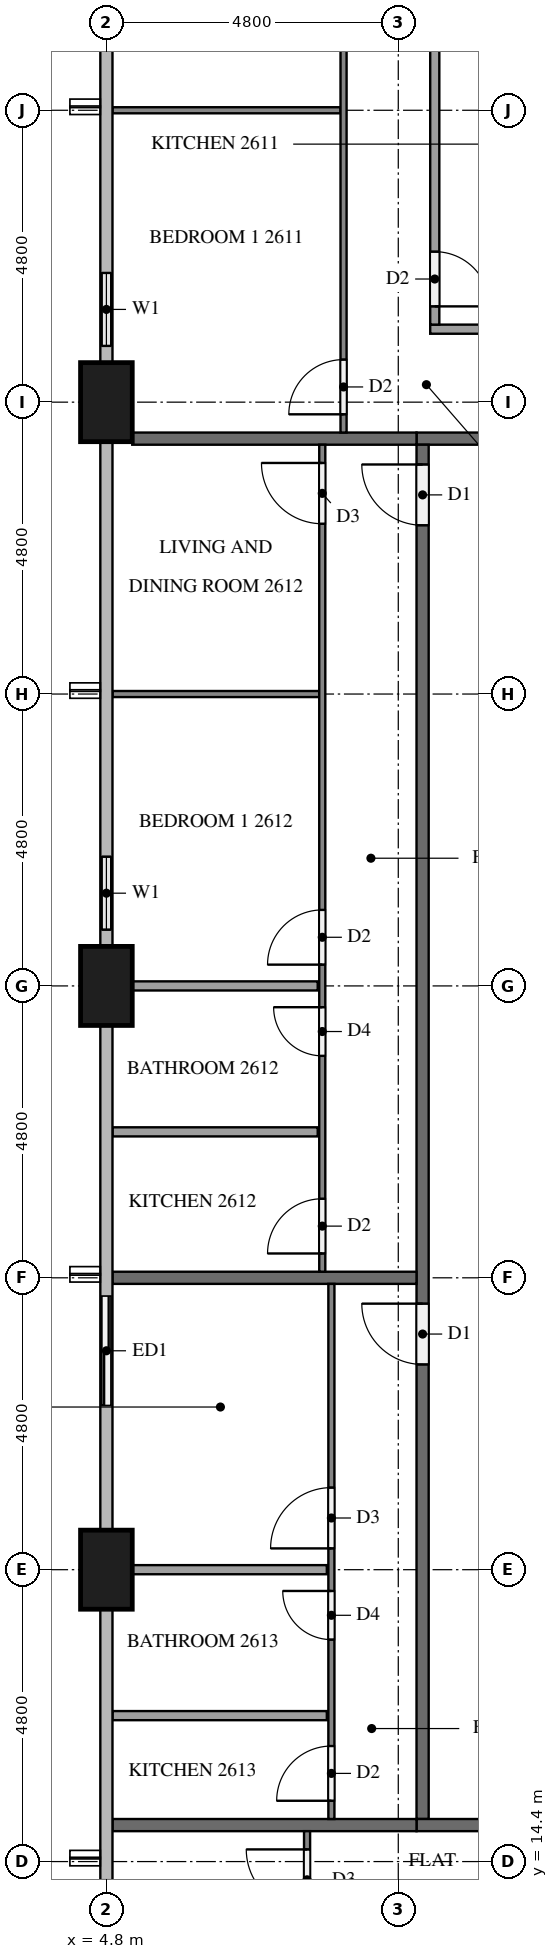
"""IFC4 building model, lengths in metres.
Left out: names, types, materials, properties, quantities, classifications, styles, units other than length and angle.
Written with IfcOpenShell. Run it as: python <this file> out.ifc"""

import sys

from ifc_helpers import new_model, si_unit, direction, frame, frame_2d, origin, origin_2d, place, context, subcontext, project, spatial, rectangle, extrude, element, fill, save


model = new_model("IFC4")
c1 = context("Model", 3, precision=1e-05, world=origin(), true_north=direction((0.0, 1.0)))
c2 = subcontext(c1, "Body", "Model", "MODEL_VIEW")
j1 = project(units=[si_unit("LENGTHUNIT", "METRE"), si_unit("PLANEANGLEUNIT", "RADIAN")], contexts=[c1])
p1 = place(None, origin())
s1 = spatial("IfcSite", under=j1, at=p1, CompositionType="ELEMENT")
p2 = place(p1, origin())
s2 = spatial("IfcBuilding", under=s1, at=p2, CompositionType="ELEMENT")
p3 = place(p2, frame((0.0, 0.0, 103.2)))
s3 = spatial("IfcBuildingStorey", under=s2, at=p3, CompositionType="ELEMENT", Elevation=103.2)
for number, where, z_axis, x_axis in (
    (1, (4.8, 38.4, 0.0), (0.0, 0.0, 1.0), (0.0, 1.0, 0.0)),
    (2, (4.8, 28.8, 0.0), (0.0, 0.0, 1.0), (0.0, 1.0, 0.0)),
    (3, (4.8, 19.2, 0.0), (0.0, 0.0, 1.0), (0.0, 1.0, 0.0)),
):
    element("IfcColumn", number, at=place(p3, frame(where, z_axis=z_axis, x_axis=x_axis)), inside=s3, PredefinedType="COLUMN", context=c2, shape_type="SweptSolid", body=[
        extrude(rectangle(XDim=1.3, YDim=0.85, at=origin_2d()), origin(), (0.0, 0.0, 1.0), 3.2),
    ])
p4 = place(p3, frame((4.8, 40.8, 0.0), z_axis=(0.0, 0.0, 1.0), x_axis=(0.0, -1.0, 0.0)))
e4 = element("IfcWall", 4, at=p4, inside=s3, PredefinedType="SOLIDWALL", context=c2, shape_type="SweptSolid", body=[
    extrude(rectangle(XDim=1.75, YDim=0.15, at=frame_2d((0.875, 0.0))), origin(), (0.0, 0.0, 1.0), 3.2),
])
p5 = place(p4, frame((0.275, 0.0, 0.9)))
e5 = element("IfcOpeningElement", 5, at=p5, cuts=e4, PredefinedType="OPENING", context=c2, shape_type="SweptSolid", body=[
    extrude(rectangle(XDim=1.2, YDim=1.4, at=frame_2d((0.6, 0.7))), frame((0.0, 0.085, 0.0), z_axis=(0.0, -1.0, 0.0), x_axis=(1.0, 0.0, 0.0)), (0.0, 0.0, 1.0), 0.17),
])
p6 = place(p3, frame((4.8, 31.2, 0.0), z_axis=(0.0, 0.0, 1.0), x_axis=(0.0, -1.0, 0.0)))
e6 = element("IfcWall", 6, at=p6, inside=s3, PredefinedType="SOLIDWALL", context=c2, shape_type="SweptSolid", body=[
    extrude(rectangle(XDim=1.75, YDim=0.15, at=frame_2d((0.875, 0.0))), origin(), (0.0, 0.0, 1.0), 3.2),
])
p7 = place(p6, frame((0.275, 0.0, 0.9)))
e7 = element("IfcOpeningElement", 7, at=p7, cuts=e6, PredefinedType="OPENING", context=c2, shape_type="SweptSolid", body=[
    extrude(rectangle(XDim=1.2, YDim=1.4, at=frame_2d((0.6, 0.7))), frame((0.0, 0.085, 0.0), z_axis=(0.0, -1.0, 0.0), x_axis=(1.0, 0.0, 0.0)), (0.0, 0.0, 1.0), 0.17),
])
p8 = place(p3, frame((4.8, 24.0, 0.0), z_axis=(0.0, 0.0, 1.0), x_axis=(0.0, -1.0, 0.0)))
e8 = element("IfcWall", 8, at=p8, inside=s3, PredefinedType="SOLIDWALL", context=c2, shape_type="SweptSolid", body=[
    extrude(rectangle(XDim=2.4, YDim=0.15, at=frame_2d((1.2, 0.0))), origin(), (0.0, 0.0, 1.0), 3.2),
])
p9 = place(p8, frame((0.3, 0.0, 0.0)))
e9 = element("IfcOpeningElement", 9, at=p9, cuts=e8, PredefinedType="OPENING", context=c2, shape_type="SweptSolid", body=[
    extrude(rectangle(XDim=1.8, YDim=2.4, at=frame_2d((0.9, 1.2))), frame((0.0, 0.085, 0.0), z_axis=(0.0, -1.0, 0.0), x_axis=(1.0, 0.0, 0.0)), (0.0, 0.0, 1.0), 0.17),
])
p10 = place(p3, frame((4.8, 14.4, 0.0), z_axis=(0.0, 0.0, 1.0), x_axis=(0.0, -1.0, 0.0)))
e10 = element("IfcWall", 10, at=p10, inside=s3, PredefinedType="SOLIDWALL", context=c2, shape_type="SweptSolid", body=[
    extrude(rectangle(XDim=2.4, YDim=0.15, at=frame_2d((1.2, 0.0))), origin(), (0.0, 0.0, 1.0), 3.2),
])
p11 = place(p10, frame((0.3, 0.0, 0.0)))
e11 = element("IfcOpeningElement", 11, at=p11, cuts=e10, PredefinedType="OPENING", context=c2, shape_type="SweptSolid", body=[
    extrude(rectangle(XDim=1.8, YDim=2.4, at=frame_2d((0.9, 1.2))), frame((0.0, 0.085, 0.0), z_axis=(0.0, -1.0, 0.0), x_axis=(1.0, 0.0, 0.0)), (0.0, 0.0, 1.0), 0.17),
])
p12 = place(p3, frame((12.1, 37.8, 0.0), z_axis=(0.0, 0.0, 1.0), x_axis=(-1.0, 0.0, 0.0)))
e12 = element("IfcWall", 12, at=p12, inside=s3, PredefinedType="PARTITIONING", context=c2, shape_type="SweptSolid", body=[
    extrude(rectangle(XDim=2.2, YDim=0.2, at=frame_2d((1.1, 0.0))), origin(), (0.0, 0.0, 1.0), 3.2),
])
p13 = place(p3, frame((10.0, 15.1, 0.0), z_axis=(0.0, 0.0, 1.0), x_axis=(0.0, 1.0, 0.0)))
e13 = element("IfcWall", 13, at=p13, inside=s3, PredefinedType="PARTITIONING", context=c2, shape_type="SweptSolid", body=[
    extrude(rectangle(XDim=22.6, YDim=0.2, at=frame_2d((11.3, 0.0))), origin(), (0.0, 0.0, 1.0), 3.2),
])
p14 = place(p13, frame((21.275, 0.0, 0.0)))
e14 = element("IfcOpeningElement", 14, at=p14, cuts=e13, PredefinedType="OPENING", context=c2, shape_type="SweptSolid", body=[
    extrude(rectangle(XDim=1.0, YDim=2.1, at=frame_2d((0.5, 1.05))), frame((0.0, 0.11, 0.0), z_axis=(0.0, -1.0, 0.0), x_axis=(1.0, 0.0, 0.0)), (0.0, 0.0, 1.0), 0.22),
])
p15 = place(p13, frame((7.475, 0.0, 0.0)))
e15 = element("IfcOpeningElement", 15, at=p15, cuts=e13, PredefinedType="OPENING", context=c2, shape_type="SweptSolid", body=[
    extrude(rectangle(XDim=1.0, YDim=2.1, at=frame_2d((0.5, 1.05))), frame((0.0, 0.11, 0.0), z_axis=(0.0, -1.0, 0.0), x_axis=(1.0, 0.0, 0.0)), (0.0, 0.0, 1.0), 0.22),
])
p16 = place(p3, frame((9.9, 15.0, 0.0), z_axis=(0.0, 0.0, 1.0), x_axis=(1.0, 0.0, 0.0)))
e16 = element("IfcWall", 16, at=p16, inside=s3, PredefinedType="PARTITIONING", context=c2, shape_type="SweptSolid", body=[
    extrude(rectangle(XDim=2.2, YDim=0.2, at=frame_2d((1.1, 0.0))), origin(), (0.0, 0.0, 1.0), 3.2),
])
p17 = place(p3, frame((5.225, 37.8, 0.0), z_axis=(0.0, 0.0, 1.0), x_axis=(1.0, 0.0, 0.0)))
e17 = element("IfcWall", 17, at=p17, inside=s3, PredefinedType="PARTITIONING", context=c2, shape_type="SweptSolid", body=[
    extrude(rectangle(XDim=4.675, YDim=0.2, at=frame_2d((2.337, 0.0))), origin(), (0.0, 0.0, 1.0), 3.2),
])
for number, where, z_axis, x_axis in (
    (18, (4.9, 24.0, 0.0), (0.0, 0.0, 1.0), (1.0, 0.0, 0.0)),
    (19, (4.9, 15.0, 0.0), (0.0, 0.0, 1.0), (1.0, 0.0, 0.0)),
):
    element("IfcWall", number, at=place(p3, frame(where, z_axis=z_axis, x_axis=x_axis)), inside=s3, PredefinedType="PARTITIONING", context=c2, shape_type="SweptSolid", body=[
        extrude(rectangle(XDim=5.0, YDim=0.2, at=frame_2d((2.5, 0.0))), origin(), (0.0, 0.0, 1.0), 3.2),
    ])
p18 = place(p3, frame((8.65, 43.2, 0.0), z_axis=(0.0, 0.0, 1.0), x_axis=(-1.0, 0.0, 0.0)))
e20 = element("IfcWall", 20, at=p18, inside=s3, PredefinedType="PARTITIONING", context=c2, shape_type="SweptSolid", body=[
    extrude(rectangle(XDim=3.75, YDim=0.1, at=frame_2d((1.875, 0.0))), origin(), (0.0, 0.0, 1.0), 3.2),
])
p19 = place(p3, frame((8.7, 37.9, 0.0), z_axis=(0.0, 0.0, 1.0), x_axis=(0.0, 1.0, 0.0)))
e21 = element("IfcWall", 21, at=p19, inside=s3, PredefinedType="PARTITIONING", context=c2, shape_type="SweptSolid", body=[
    extrude(rectangle(XDim=14.559, YDim=0.1, at=frame_2d((7.279, 0.0))), origin(), (0.0, 0.0, 1.0), 3.2),
])
p20 = place(p19, frame((0.3, 0.0, 0.0)))
e22 = element("IfcOpeningElement", 22, at=p20, cuts=e21, PredefinedType="OPENING", context=c2, shape_type="SweptSolid", body=[
    extrude(rectangle(XDim=0.9, YDim=2.1, at=frame_2d((0.45, 1.05))), frame((0.0, 0.06, 0.0), z_axis=(0.0, -1.0, 0.0), x_axis=(1.0, 0.0, 0.0)), (0.0, 0.0, 1.0), 0.12),
])
p21 = place(p19, frame((8.85, 0.0, 0.0)))
e23 = element("IfcOpeningElement", 23, at=p21, cuts=e21, PredefinedType="OPENING", context=c2, shape_type="SweptSolid", body=[
    extrude(rectangle(XDim=0.9, YDim=2.1, at=frame_2d((0.45, 1.05))), frame((0.0, 0.06, 0.0), z_axis=(0.0, -1.0, 0.0), x_axis=(1.0, 0.0, 0.0)), (0.0, 0.0, 1.0), 0.12),
])
p22 = place(p19, frame((10.45, 0.0, 0.0)))
e24 = element("IfcOpeningElement", 24, at=p22, cuts=e21, PredefinedType="OPENING", context=c2, shape_type="SweptSolid", body=[
    extrude(rectangle(XDim=1.0, YDim=2.1, at=frame_2d((0.5, 1.05))), frame((0.0, 0.06, 0.0), z_axis=(0.0, -1.0, 0.0), x_axis=(1.0, 0.0, 0.0)), (0.0, 0.0, 1.0), 0.12),
])
p23 = place(p3, frame((11.9, 39.6, 0.0), z_axis=(0.0, 0.0, 1.0), x_axis=(-1.0, 0.0, 0.0)))
e25 = element("IfcWall", 25, at=p23, inside=s3, PredefinedType="PARTITIONING", context=c2, shape_type="SweptSolid", body=[
    extrude(rectangle(XDim=1.775, YDim=0.15, at=frame_2d((0.887, 0.0))), origin(), (0.0, 0.0, 1.0), 3.2),
])
p24 = place(p3, frame((10.2, 52.225, 0.0), z_axis=(0.0, 0.0, 1.0), x_axis=(0.0, -1.0, 0.0)))
e26 = element("IfcWall", 26, at=p24, inside=s3, PredefinedType="PARTITIONING", context=c2, shape_type="SweptSolid", body=[
    extrude(rectangle(XDim=12.55, YDim=0.15, at=frame_2d((6.275, 0.0))), origin(), (0.0, 0.0, 1.0), 3.2),
])
p25 = place(p24, frame((11.35, 0.0, 0.0)))
e27 = element("IfcOpeningElement", 27, at=p25, cuts=e26, PredefinedType="OPENING", context=c2, shape_type="SweptSolid", body=[
    extrude(rectangle(XDim=0.9, YDim=2.1, at=frame_2d((0.45, 1.05))), frame((0.0, 0.085, 0.0), z_axis=(0.0, -1.0, 0.0), x_axis=(1.0, 0.0, 0.0)), (0.0, 0.0, 1.0), 0.17),
])
p26 = place(p24, frame((3.858, 0.0, 0.0)))
e28 = element("IfcOpeningElement", 28, at=p26, cuts=e26, PredefinedType="OPENING", context=c2, shape_type="SweptSolid", body=[
    extrude(rectangle(XDim=0.8, YDim=2.1, at=frame_2d((0.4, 1.05))), frame((0.0, 0.085, 0.0), z_axis=(0.0, -1.0, 0.0), x_axis=(1.0, 0.0, 0.0)), (0.0, 0.0, 1.0), 0.17),
])
p27 = place(p24, frame((2.308, 0.0, 0.0)))
e29 = element("IfcOpeningElement", 29, at=p27, cuts=e26, PredefinedType="OPENING", context=c2, shape_type="SweptSolid", body=[
    extrude(rectangle(XDim=0.9, YDim=2.1, at=frame_2d((0.45, 1.05))), frame((0.0, 0.085, 0.0), z_axis=(0.0, -1.0, 0.0), x_axis=(1.0, 0.0, 0.0)), (0.0, 0.0, 1.0), 0.17),
])
p28 = place(p3, frame((8.3, 33.6, 0.0), z_axis=(0.0, 0.0, 1.0), x_axis=(-1.0, 0.0, 0.0)))
e30 = element("IfcWall", 30, at=p28, inside=s3, PredefinedType="PARTITIONING", context=c2, shape_type="SweptSolid", body=[
    extrude(rectangle(XDim=3.4, YDim=0.1, at=frame_2d((1.7, 0.0))), origin(), (0.0, 0.0, 1.0), 3.2),
])
p29 = place(p3, frame((8.275, 28.8, 0.0), z_axis=(0.0, 0.0, 1.0), x_axis=(-1.0, 0.0, 0.0)))
e31 = element("IfcWall", 31, at=p29, inside=s3, PredefinedType="PARTITIONING", context=c2, shape_type="SweptSolid", body=[
    extrude(rectangle(XDim=3.05, YDim=0.15, at=frame_2d((1.525, 0.0))), origin(), (0.0, 0.0, 1.0), 3.2),
])
p30 = place(p3, frame((8.275, 26.4, 0.0), z_axis=(0.0, 0.0, 1.0), x_axis=(-1.0, 0.0, 0.0)))
e32 = element("IfcWall", 32, at=p30, inside=s3, PredefinedType="PARTITIONING", context=c2, shape_type="SweptSolid", body=[
    extrude(rectangle(XDim=3.375, YDim=0.15, at=frame_2d((1.688, 0.0))), origin(), (0.0, 0.0, 1.0), 3.2),
])
p31 = place(p3, frame((8.35, 24.1, 0.0), z_axis=(0.0, 0.0, 1.0), x_axis=(0.0, 1.0, 0.0)))
e33 = element("IfcWall", 33, at=p31, inside=s3, PredefinedType="PARTITIONING", context=c2, shape_type="SweptSolid", body=[
    extrude(rectangle(XDim=13.6, YDim=0.1, at=frame_2d((6.8, 0.0))), origin(), (0.0, 0.0, 1.0), 3.2),
])
p32 = place(p31, frame((12.3, 0.0, 0.0)))
e34 = element("IfcOpeningElement", 34, at=p32, cuts=e33, PredefinedType="OPENING", context=c2, shape_type="SweptSolid", body=[
    extrude(rectangle(XDim=1.0, YDim=2.1, at=frame_2d((0.5, 1.05))), frame((0.0, 0.06, 0.0), z_axis=(0.0, -1.0, 0.0), x_axis=(1.0, 0.0, 0.0)), (0.0, 0.0, 1.0), 0.12),
])
p33 = place(p31, frame((5.05, 0.0, 0.0)))
e35 = element("IfcOpeningElement", 35, at=p33, cuts=e33, PredefinedType="OPENING", context=c2, shape_type="SweptSolid", body=[
    extrude(rectangle(XDim=0.9, YDim=2.1, at=frame_2d((0.45, 1.05))), frame((0.0, 0.06, 0.0), z_axis=(0.0, -1.0, 0.0), x_axis=(1.0, 0.0, 0.0)), (0.0, 0.0, 1.0), 0.12),
])
p34 = place(p31, frame((3.55, 0.0, 0.0)))
e36 = element("IfcOpeningElement", 36, at=p34, cuts=e33, PredefinedType="OPENING", context=c2, shape_type="SweptSolid", body=[
    extrude(rectangle(XDim=0.8, YDim=2.1, at=frame_2d((0.4, 1.05))), frame((0.0, 0.06, 0.0), z_axis=(0.0, -1.0, 0.0), x_axis=(1.0, 0.0, 0.0)), (0.0, 0.0, 1.0), 0.12),
])
p35 = place(p31, frame((0.3, 0.0, 0.0)))
e37 = element("IfcOpeningElement", 37, at=p35, cuts=e33, PredefinedType="OPENING", context=c2, shape_type="SweptSolid", body=[
    extrude(rectangle(XDim=0.9, YDim=2.1, at=frame_2d((0.45, 1.05))), frame((0.0, 0.06, 0.0), z_axis=(0.0, -1.0, 0.0), x_axis=(1.0, 0.0, 0.0)), (0.0, 0.0, 1.0), 0.12),
])
p36 = place(p3, frame((8.425, 19.2, 0.0), z_axis=(0.0, 0.0, 1.0), x_axis=(-1.0, 0.0, 0.0)))
e38 = element("IfcWall", 38, at=p36, inside=s3, PredefinedType="PARTITIONING", context=c2, shape_type="SweptSolid", body=[
    extrude(rectangle(XDim=3.2, YDim=0.15, at=frame_2d((1.6, 0.0))), origin(), (0.0, 0.0, 1.0), 3.2),
])
p37 = place(p3, frame((8.425, 16.8, 0.0), z_axis=(0.0, 0.0, 1.0), x_axis=(-1.0, 0.0, 0.0)))
e39 = element("IfcWall", 39, at=p37, inside=s3, PredefinedType="PARTITIONING", context=c2, shape_type="SweptSolid", body=[
    extrude(rectangle(XDim=3.525, YDim=0.15, at=frame_2d((1.763, 0.0))), origin(), (0.0, 0.0, 1.0), 3.2),
])
p38 = place(p3, frame((8.5, 15.1, 0.0), z_axis=(0.0, 0.0, 1.0), x_axis=(0.0, 1.0, 0.0)))
e40 = element("IfcWall", 40, at=p38, inside=s3, PredefinedType="PARTITIONING", context=c2, shape_type="SweptSolid", body=[
    extrude(rectangle(XDim=8.8, YDim=0.1, at=frame_2d((4.4, 0.0))), origin(), (0.0, 0.0, 1.0), 3.2),
])
p39 = place(p38, frame((4.45, 0.0, 0.0)))
e41 = element("IfcOpeningElement", 41, at=p39, cuts=e40, PredefinedType="OPENING", context=c2, shape_type="SweptSolid", body=[
    extrude(rectangle(XDim=1.0, YDim=2.1, at=frame_2d((0.5, 1.05))), frame((0.0, 0.06, 0.0), z_axis=(0.0, -1.0, 0.0), x_axis=(1.0, 0.0, 0.0)), (0.0, 0.0, 1.0), 0.12),
])
p40 = place(p38, frame((2.95, 0.0, 0.0)))
e42 = element("IfcOpeningElement", 42, at=p40, cuts=e40, PredefinedType="OPENING", context=c2, shape_type="SweptSolid", body=[
    extrude(rectangle(XDim=0.8, YDim=2.1, at=frame_2d((0.4, 1.05))), frame((0.0, 0.06, 0.0), z_axis=(0.0, -1.0, 0.0), x_axis=(1.0, 0.0, 0.0)), (0.0, 0.0, 1.0), 0.12),
])
p41 = place(p38, frame((0.3, 0.0, 0.0)))
e43 = element("IfcOpeningElement", 43, at=p41, cuts=e40, PredefinedType="OPENING", context=c2, shape_type="SweptSolid", body=[
    extrude(rectangle(XDim=0.9, YDim=2.1, at=frame_2d((0.45, 1.05))), frame((0.0, 0.06, 0.0), z_axis=(0.0, -1.0, 0.0), x_axis=(1.0, 0.0, 0.0)), (0.0, 0.0, 1.0), 0.12),
])
p42 = place(p3, frame((8.1, 5.302, 0.0), z_axis=(0.0, 0.0, 1.0), x_axis=(0.0, 1.0, 0.0)))
e44 = element("IfcWall", 44, at=p42, inside=s3, PredefinedType="PARTITIONING", context=c2, shape_type="SweptSolid", body=[
    extrude(rectangle(XDim=9.598, YDim=0.1, at=frame_2d((4.799, 0.0))), origin(), (0.0, 0.0, 1.0), 3.2),
])
p43 = place(p42, frame((8.298, 0.0, 0.0)))
e45 = element("IfcOpeningElement", 45, at=p43, cuts=e44, PredefinedType="OPENING", context=c2, shape_type="SweptSolid", body=[
    extrude(rectangle(XDim=1.0, YDim=2.1, at=frame_2d((0.5, 1.05))), frame((0.0, 0.06, 0.0), z_axis=(0.0, -1.0, 0.0), x_axis=(1.0, 0.0, 0.0)), (0.0, 0.0, 1.0), 0.12),
])
p44 = place(p42, frame((0.3, 0.0, 0.0)))
e46 = element("IfcOpeningElement", 46, at=p44, cuts=e44, PredefinedType="OPENING", context=c2, shape_type="SweptSolid", body=[
    extrude(rectangle(XDim=0.9, YDim=2.1, at=frame_2d((0.45, 1.05))), frame((0.0, 0.06, 0.0), z_axis=(0.0, -1.0, 0.0), x_axis=(1.0, 0.0, 0.0)), (0.0, 0.0, 1.0), 0.12),
])
p45 = place(p5, origin())
e47 = element("IfcWindow", 47, at=p45, inside=s3, PartitioningType="SINGLE_PANEL", PredefinedType="WINDOW", context=c2, shape_type="SweptSolid", body=[
    extrude(rectangle(XDim=1.2, YDim=1.4, at=frame_2d((0.6, 0.7))), frame((0.0, 0.03, 0.0), z_axis=(0.0, -1.0, 0.0), x_axis=(1.0, 0.0, 0.0)), (0.0, 0.0, 1.0), 0.06),
])
fill(e5, e47)
p46 = place(p7, origin())
e48 = element("IfcWindow", 48, at=p46, inside=s3, PartitioningType="SINGLE_PANEL", PredefinedType="WINDOW", context=c2, shape_type="SweptSolid", body=[
    extrude(rectangle(XDim=1.2, YDim=1.4, at=frame_2d((0.6, 0.7))), frame((0.0, 0.03, 0.0), z_axis=(0.0, -1.0, 0.0), x_axis=(1.0, 0.0, 0.0)), (0.0, 0.0, 1.0), 0.06),
])
fill(e7, e48)
p47 = place(p9, origin())
e49 = element("IfcDoor", 49, at=p47, inside=s3, OperationType="SLIDING_TO_LEFT", PredefinedType="DOOR", context=c2, shape_type="SweptSolid", body=[
    extrude(rectangle(XDim=1.8, YDim=2.4, at=frame_2d((0.9, 1.2))), frame((0.0, 0.025, 0.0), z_axis=(0.0, -1.0, 0.0), x_axis=(1.0, 0.0, 0.0)), (0.0, 0.0, 1.0), 0.05),
])
fill(e9, e49)
p48 = place(p14, origin())
e50 = element("IfcDoor", 50, at=p48, inside=s3, OperationType="SINGLE_SWING_RIGHT", PredefinedType="DOOR", context=c2, shape_type="SweptSolid", body=[
    extrude(rectangle(XDim=1.0, YDim=2.1, at=frame_2d((0.5, 1.05))), frame((0.0, 0.025, 0.0), z_axis=(0.0, -1.0, 0.0), x_axis=(1.0, 0.0, 0.0)), (0.0, 0.0, 1.0), 0.05),
])
fill(e14, e50)
p49 = place(p15, origin())
e51 = element("IfcDoor", 51, at=p49, inside=s3, OperationType="SINGLE_SWING_RIGHT", PredefinedType="DOOR", context=c2, shape_type="SweptSolid", body=[
    extrude(rectangle(XDim=1.0, YDim=2.1, at=frame_2d((0.5, 1.05))), frame((0.0, 0.025, 0.0), z_axis=(0.0, -1.0, 0.0), x_axis=(1.0, 0.0, 0.0)), (0.0, 0.0, 1.0), 0.05),
])
fill(e15, e51)
p50 = place(p20, origin())
e52 = element("IfcDoor", 52, at=p50, inside=s3, OperationType="SINGLE_SWING_LEFT", PredefinedType="DOOR", context=c2, shape_type="SweptSolid", body=[
    extrude(rectangle(XDim=0.9, YDim=2.1, at=frame_2d((0.45, 1.05))), frame((0.0, 0.025, 0.0), z_axis=(0.0, -1.0, 0.0), x_axis=(1.0, 0.0, 0.0)), (0.0, 0.0, 1.0), 0.05),
])
fill(e22, e52)
p51 = place(p25, origin())
e53 = element("IfcDoor", 53, at=p51, inside=s3, OperationType="SINGLE_SWING_RIGHT", PredefinedType="DOOR", context=c2, shape_type="SweptSolid", body=[
    extrude(rectangle(XDim=0.9, YDim=2.1, at=frame_2d((0.45, 1.05))), frame((0.0, 0.025, 0.0), z_axis=(0.0, -1.0, 0.0), x_axis=(1.0, 0.0, 0.0)), (0.0, 0.0, 1.0), 0.05),
])
fill(e27, e53)
p52 = place(p32, origin())
e54 = element("IfcDoor", 54, at=p52, inside=s3, OperationType="SINGLE_SWING_RIGHT", PredefinedType="DOOR", context=c2, shape_type="SweptSolid", body=[
    extrude(rectangle(XDim=1.0, YDim=2.1, at=frame_2d((0.5, 1.05))), frame((0.0, 0.025, 0.0), z_axis=(0.0, -1.0, 0.0), x_axis=(1.0, 0.0, 0.0)), (0.0, 0.0, 1.0), 0.05),
])
fill(e34, e54)
p53 = place(p33, origin())
e55 = element("IfcDoor", 55, at=p53, inside=s3, OperationType="SINGLE_SWING_LEFT", PredefinedType="DOOR", context=c2, shape_type="SweptSolid", body=[
    extrude(rectangle(XDim=0.9, YDim=2.1, at=frame_2d((0.45, 1.05))), frame((0.0, 0.025, 0.0), z_axis=(0.0, -1.0, 0.0), x_axis=(1.0, 0.0, 0.0)), (0.0, 0.0, 1.0), 0.05),
])
fill(e35, e55)
p54 = place(p34, origin())
e56 = element("IfcDoor", 56, at=p54, inside=s3, OperationType="SINGLE_SWING_RIGHT", PredefinedType="DOOR", context=c2, shape_type="SweptSolid", body=[
    extrude(rectangle(XDim=0.8, YDim=2.1, at=frame_2d((0.4, 1.05))), frame((0.0, 0.025, 0.0), z_axis=(0.0, -1.0, 0.0), x_axis=(1.0, 0.0, 0.0)), (0.0, 0.0, 1.0), 0.05),
])
fill(e36, e56)
p55 = place(p35, origin())
e57 = element("IfcDoor", 57, at=p55, inside=s3, OperationType="SINGLE_SWING_LEFT", PredefinedType="DOOR", context=c2, shape_type="SweptSolid", body=[
    extrude(rectangle(XDim=0.9, YDim=2.1, at=frame_2d((0.45, 1.05))), frame((0.0, 0.025, 0.0), z_axis=(0.0, -1.0, 0.0), x_axis=(1.0, 0.0, 0.0)), (0.0, 0.0, 1.0), 0.05),
])
fill(e37, e57)
p56 = place(p39, origin())
e58 = element("IfcDoor", 58, at=p56, inside=s3, OperationType="SINGLE_SWING_LEFT", PredefinedType="DOOR", context=c2, shape_type="SweptSolid", body=[
    extrude(rectangle(XDim=1.0, YDim=2.1, at=frame_2d((0.5, 1.05))), frame((0.0, 0.025, 0.0), z_axis=(0.0, -1.0, 0.0), x_axis=(1.0, 0.0, 0.0)), (0.0, 0.0, 1.0), 0.05),
])
fill(e41, e58)
p57 = place(p40, origin())
e59 = element("IfcDoor", 59, at=p57, inside=s3, OperationType="SINGLE_SWING_RIGHT", PredefinedType="DOOR", context=c2, shape_type="SweptSolid", body=[
    extrude(rectangle(XDim=0.8, YDim=2.1, at=frame_2d((0.4, 1.05))), frame((0.0, 0.025, 0.0), z_axis=(0.0, -1.0, 0.0), x_axis=(1.0, 0.0, 0.0)), (0.0, 0.0, 1.0), 0.05),
])
fill(e42, e59)
p58 = place(p41, origin())
e60 = element("IfcDoor", 60, at=p58, inside=s3, OperationType="SINGLE_SWING_LEFT", PredefinedType="DOOR", context=c2, shape_type="SweptSolid", body=[
    extrude(rectangle(XDim=0.9, YDim=2.1, at=frame_2d((0.45, 1.05))), frame((0.0, 0.025, 0.0), z_axis=(0.0, -1.0, 0.0), x_axis=(1.0, 0.0, 0.0)), (0.0, 0.0, 1.0), 0.05),
])
fill(e43, e60)
p59 = place(p43, origin())
e61 = element("IfcDoor", 61, at=p59, inside=s3, OperationType="SINGLE_SWING_RIGHT", PredefinedType="DOOR", context=c2, shape_type="SweptSolid", body=[
    extrude(rectangle(XDim=1.0, YDim=2.1, at=frame_2d((0.5, 1.05))), frame((0.0, 0.025, 0.0), z_axis=(0.0, -1.0, 0.0), x_axis=(1.0, 0.0, 0.0)), (0.0, 0.0, 1.0), 0.05),
])
fill(e45, e61)
save(model, sys.argv[1])
